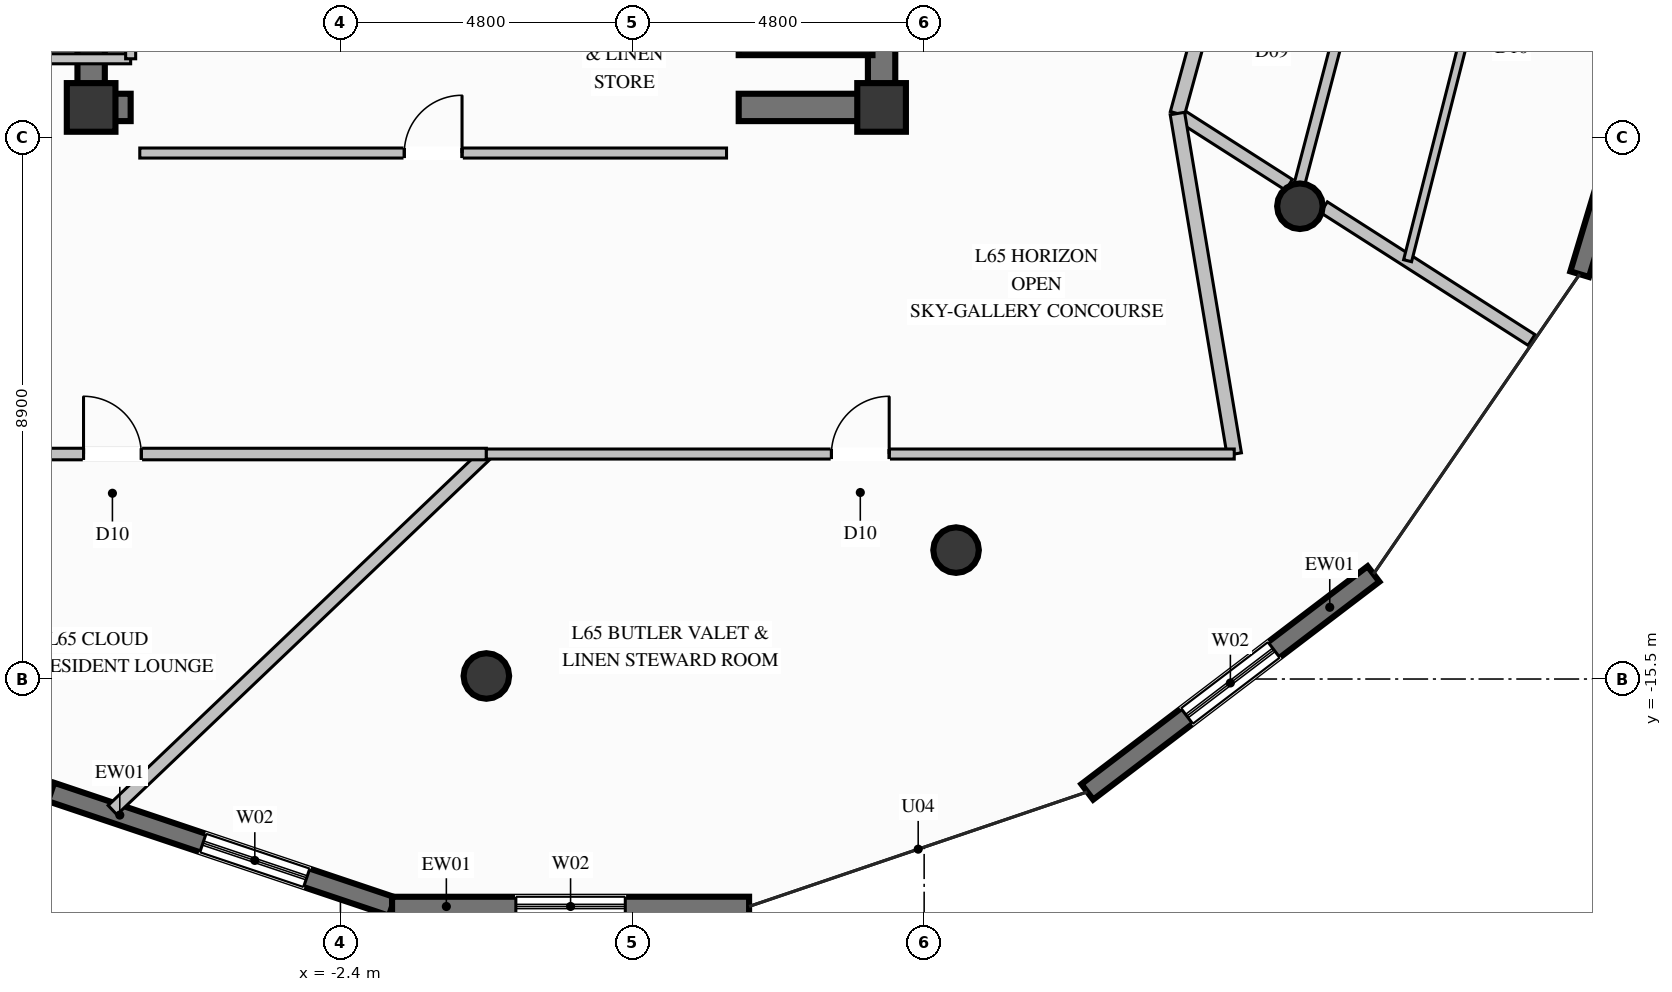
"""IFC4 building model, lengths in metres.
Left out: names, types, materials, properties, quantities, classifications, styles, units other than length and angle.
Written with IfcOpenShell. Run it as: python <this file> out.ifc"""

import sys

from ifc_helpers import new_model, si_unit, direction, frame, frame_2d, origin, origin_2d, place, context, subcontext, project, spatial, rectangle, circle, extrude, element, fill, save


model = new_model("IFC4")
c1 = context("Model", 3, precision=1e-05, world=origin(), true_north=direction((0.0, 1.0)))
c2 = subcontext(c1, "Body", "Model", "MODEL_VIEW")
j1 = project(units=[si_unit("LENGTHUNIT", "METRE"), si_unit("PLANEANGLEUNIT", "RADIAN")], contexts=[c1])
p1 = place(None, origin())
s1 = spatial("IfcSite", under=j1, at=p1, CompositionType="ELEMENT")
p2 = place(p1, origin())
s2 = spatial("IfcBuilding", under=s1, at=p2, CompositionType="ELEMENT")
p3 = place(p2, frame((0.0, 0.0, 250.6)))
s3 = spatial("IfcBuildingStorey", under=s2, at=p3, CompositionType="ELEMENT", Elevation=250.6)
for number, where, z_axis, x_axis in (
    (1, (-6.5, -6.1, 0.0), (0.0, 0.0, 1.0), (1.0, 0.0, 0.0)),
    (2, (6.5, -6.1, 0.0), (0.0, 0.0, 1.0), (1.0, 0.0, 0.0)),
):
    element("IfcColumn", number, at=place(p3, frame(where, z_axis=z_axis, x_axis=x_axis)), inside=s3, PredefinedType="COLUMN", context=c2, shape_type="SweptSolid", body=[
        extrude(rectangle(XDim=0.8, YDim=0.8, at=origin_2d()), origin(), (0.0, 0.0, 1.0), 3.8),
    ])
p4 = place(p3, frame((-6.275, -6.1, 0.0), z_axis=(0.0, 0.0, 1.0), x_axis=(1.0, 0.0, 0.0)))
e3 = element("IfcWall", 3, at=p4, inside=s3, PredefinedType="SHEAR", context=c2, shape_type="SweptSolid", body=[
    extrude(rectangle(XDim=0.425, YDim=0.45, at=frame_2d((0.212, 0.0))), origin(), (0.0, 0.0, 1.0), 3.8),
])
p5 = place(p3, frame((4.15, -6.1, 0.0), z_axis=(0.0, 0.0, 1.0), x_axis=(1.0, 0.0, 0.0)))
e4 = element("IfcWall", 4, at=p5, inside=s3, PredefinedType="SHEAR", context=c2, shape_type="SweptSolid", body=[
    extrude(rectangle(XDim=2.125, YDim=0.45, at=frame_2d((1.062, 0.0))), origin(), (0.0, 0.0, 1.0), 3.8),
])
p6 = place(p3, frame((-6.5, -6.325, 0.0), z_axis=(0.0, 0.0, 1.0), x_axis=(0.0, 1.0, 0.0)))
e5 = element("IfcWall", 5, at=p6, inside=s3, PredefinedType="SHEAR", context=c2, shape_type="SweptSolid", body=[
    extrude(rectangle(XDim=2.975, YDim=0.45, at=frame_2d((1.487, 0.0))), origin(), (0.0, 0.0, 1.0), 3.8),
])
p7 = place(p3, frame((6.5, -6.325, 0.0), z_axis=(0.0, 0.0, 1.0), x_axis=(0.0, 1.0, 0.0)))
e6 = element("IfcWall", 6, at=p7, inside=s3, PredefinedType="SHEAR", context=c2, shape_type="SweptSolid", body=[
    extrude(rectangle(XDim=3.975, YDim=0.45, at=frame_2d((1.987, 0.0))), origin(), (0.0, 0.0, 1.0), 3.8),
])
for number, where, z_axis, x_axis in (
    (7, (0.0, -15.45, 0.0), (0.0, 0.0, 1.0), (1.0, 0.0, 0.0)),
    (8, (7.725, -13.38, 0.0), (0.0, 0.0, 1.0), (1.0, 0.0, 0.0)),
    (9, (13.38, -7.725, 0.0), (0.0, 0.0, 1.0), (1.0, 0.0, 0.0)),
):
    element("IfcColumn", number, at=place(p3, frame(where, z_axis=z_axis, x_axis=x_axis)), inside=s3, PredefinedType="COLUMN", context=c2, shape_type="SweptSolid", body=[
        extrude(circle(Radius=0.375, at=origin_2d()), origin(), (0.0, 0.0, 1.0), 3.8),
    ])
p8 = place(p3, frame((14.59, -13.773, 0.0), z_axis=(0.0, 0.0, 1.0), x_axis=(-0.795700701096, -0.605690015004, 0.0)))
e10 = element("IfcWall", 10, at=p8, inside=s3, PredefinedType="SOLIDWALL", context=c2, shape_type="SweptSolid", body=[
    extrude(rectangle(XDim=5.916, YDim=0.32, at=frame_2d((2.958, 0.0))), origin(), (0.0, 0.0, 1.0), 3.57),
])
p9 = place(p8, frame((2.058, 0.0, 0.35)))
e11 = element("IfcOpeningElement", 11, at=p9, cuts=e10, PredefinedType="OPENING", context=c2, shape_type="SweptSolid", body=[
    extrude(rectangle(XDim=1.8, YDim=2.6, at=frame_2d((0.9, 1.3))), frame((0.0, 0.17, 0.0), z_axis=(0.0, -1.0, 0.0), x_axis=(1.0, 0.0, 0.0)), (0.0, 0.0, 1.0), 0.34),
])
p10 = place(p3, frame((19.725, -3.045, 0.0), z_axis=(0.0, 0.0, 1.0), x_axis=(-0.288106265848, -0.957598443806, 0.0)))
e12 = element("IfcWall", 12, at=p10, inside=s3, PredefinedType="SOLIDWALL", context=c2, shape_type="SweptSolid", body=[
    extrude(rectangle(XDim=6.054, YDim=0.32, at=frame_2d((3.027, 0.0))), origin(), (0.0, 0.0, 1.0), 3.57),
])
p11 = place(p10, frame((2.127, 0.0, 0.35)))
e13 = element("IfcOpeningElement", 13, at=p11, cuts=e12, PredefinedType="OPENING", context=c2, shape_type="SweptSolid", body=[
    extrude(rectangle(XDim=1.8, YDim=2.6, at=frame_2d((0.9, 1.3))), frame((0.0, 0.17, 0.0), z_axis=(0.0, -1.0, 0.0), x_axis=(1.0, 0.0, 0.0)), (0.0, 0.0, 1.0), 0.34),
])
p12 = place(p3, frame((-1.551, -19.241, 0.0), z_axis=(0.0, 0.0, 1.0), x_axis=(-0.947983518986, 0.31831941149, 0.0)))
e14 = element("IfcWall", 14, at=p12, inside=s3, PredefinedType="SOLIDWALL", context=c2, shape_type="SweptSolid", body=[
    extrude(rectangle(XDim=5.916, YDim=0.32, at=frame_2d((2.958, 0.0))), origin(), (0.0, 0.0, 1.0), 3.57),
])
p13 = place(p12, frame((1.481, 0.0, 0.35)))
e15 = element("IfcOpeningElement", 15, at=p13, cuts=e14, PredefinedType="OPENING", context=c2, shape_type="SweptSolid", body=[
    extrude(rectangle(XDim=1.8, YDim=2.6, at=frame_2d((0.9, 1.3))), frame((0.0, 0.17, 0.0), z_axis=(0.0, -1.0, 0.0), x_axis=(1.0, 0.0, 0.0)), (0.0, 0.0, 1.0), 0.34),
])
p14 = place(p3, frame((4.321, -19.24, 0.0), z_axis=(0.0, 0.0, 1.0), x_axis=(-0.999999986171, -0.000166306334, 0.0)))
e16 = element("IfcWall", 16, at=p14, inside=s3, PredefinedType="SOLIDWALL", context=c2, shape_type="SweptSolid", body=[
    extrude(rectangle(XDim=5.872, YDim=0.32, at=frame_2d((2.936, 0.0))), origin(), (0.0, 0.0, 1.0), 3.57),
])
p15 = place(p14, frame((2.036, 0.0, 0.35)))
e17 = element("IfcOpeningElement", 17, at=p15, cuts=e16, PredefinedType="OPENING", context=c2, shape_type="SweptSolid", body=[
    extrude(rectangle(XDim=1.8, YDim=2.6, at=frame_2d((0.9, 1.3))), frame((0.0, 0.17, 0.0), z_axis=(0.0, -1.0, 0.0), x_axis=(1.0, 0.0, 0.0)), (0.0, 0.0, 1.0), 0.34),
])
p16 = place(p3, frame((4.15, -5.1, 0.0), z_axis=(0.0, 0.0, 1.0), x_axis=(1.0, 0.0, 0.0)))
e18 = element("IfcWall", 18, at=p16, inside=s3, PredefinedType="SOLIDWALL", context=c2, shape_type="SweptSolid", body=[
    extrude(rectangle(XDim=2.2, YDim=0.28, at=frame_2d((1.1, 0.0))), origin(), (0.0, 0.0, 1.0), 3.57),
])
p17 = place(p3, frame((-7.35, -5.3, 0.0), z_axis=(0.0, 0.0, 1.0), x_axis=(1.0, 0.0, 0.0)))
e19 = element("IfcWall", 19, at=p17, inside=s3, PredefinedType="PARTITIONING", context=c2, shape_type="SweptSolid", body=[
    extrude(rectangle(XDim=1.5, YDim=0.165, at=frame_2d((0.75, 0.0))), origin(), (0.0, 0.0, 1.0), 2.655),
])
p18 = place(p3, frame((-5.85, -5.3, 0.0), z_axis=(0.0, 0.0, 1.0), x_axis=(0.0, 1.0, 0.0)))
e20 = element("IfcWall", 20, at=p18, inside=s3, PredefinedType="PARTITIONING", context=c2, shape_type="SweptSolid", body=[
    extrude(rectangle(XDim=2.5, YDim=0.165, at=frame_2d((1.25, 0.0))), origin(), (0.0, 0.0, 1.0), 2.655),
])
p19 = place(p3, frame((-5.7, -6.85, 0.0), z_axis=(0.0, 0.0, 1.0), x_axis=(1.0, 0.0, 0.0)))
e21 = element("IfcWall", 21, at=p19, inside=s3, PredefinedType="PARTITIONING", context=c2, shape_type="SweptSolid", body=[
    extrude(rectangle(XDim=9.65, YDim=0.165, at=frame_2d((4.825, 0.0))), origin(), (0.0, 0.0, 1.0), 2.655),
])
p20 = place(p19, frame((4.35, 0.0, 0.0)))
e22 = element("IfcOpeningElement", 22, at=p20, cuts=e21, PredefinedType="OPENING", context=c2, shape_type="SweptSolid", body=[
    extrude(rectangle(XDim=0.95, YDim=2.1, at=frame_2d((0.475, 1.05))), frame((0.0, 0.093, 0.0), z_axis=(0.0, -1.0, 0.0), x_axis=(1.0, 0.0, 0.0)), (0.0, 0.0, 1.0), 0.185),
])
p21 = place(p3, frame((11.365, -6.2, 0.0), z_axis=(0.0, 0.0, 1.0), x_axis=(0.842537994554, -0.538636916422, 0.0)))
e23 = element("IfcWall", 23, at=p21, inside=s3, PredefinedType="PARTITIONING", context=c2, shape_type="SweptSolid", body=[
    extrude(rectangle(XDim=2.178, YDim=0.21, at=frame_2d((1.089, 0.0))), origin(), (0.0, 0.0, 1.0), 3.086),
])
p22 = place(p3, frame((13.775, -7.741, 0.0), z_axis=(0.0, 0.0, 1.0), x_axis=(0.842483599118, -0.538721992514, 0.0)))
e24 = element("IfcWall", 24, at=p22, inside=s3, PredefinedType="PARTITIONING", context=c2, shape_type="SweptSolid", body=[
    extrude(rectangle(XDim=4.052, YDim=0.21, at=frame_2d((2.026, 0.0))), origin(), (0.0, 0.0, 1.0), 3.57),
])
p23 = place(p3, frame((11.365, -6.2, 0.0), z_axis=(0.0, 0.0, 1.0), x_axis=(0.263670269996, 0.964612869871, 0.0)))
e25 = element("IfcWall", 25, at=p23, inside=s3, PredefinedType="PARTITIONING", context=c2, shape_type="SweptSolid", body=[
    extrude(rectangle(XDim=2.765, YDim=0.24, at=frame_2d((1.382, 0.0))), origin(), (0.0, 0.0, 1.0), 3.57),
])
p24 = place(p3, frame((13.345, -7.466, 0.0), z_axis=(0.0, 0.0, 1.0), x_axis=(0.253626036533, 0.967302348593, 0.0)))
e26 = element("IfcWall", 26, at=p24, inside=s3, PredefinedType="PLUMBINGWALL", context=c2, shape_type="SweptSolid", body=[
    extrude(rectangle(XDim=3.284, YDim=0.175, at=frame_2d((1.642, 0.0))), origin(), (0.0, 0.0, 1.0), 3.139),
])
p25 = place(p3, frame((15.151, -8.621, 0.0), z_axis=(0.0, 0.0, 1.0), x_axis=(0.246404425265, 0.969167095608, 0.0)))
e27 = element("IfcWall", 27, at=p25, inside=s3, PredefinedType="PARTITIONING", context=c2, shape_type="SweptSolid", body=[
    extrude(rectangle(XDim=8.949, YDim=0.135, at=frame_2d((4.475, 0.0))), origin(), (0.0, 0.0, 1.0), 3.57),
])
p26 = place(p25, frame((3.999, 0.0, 0.0)))
e28 = element("IfcOpeningElement", 28, at=p26, cuts=e27, PredefinedType="OPENING", context=c2, shape_type="SweptSolid", body=[
    extrude(rectangle(XDim=0.95, YDim=2.1, at=frame_2d((0.475, 1.05))), frame((0.0, 0.078, 0.0), z_axis=(0.0, -1.0, 0.0), x_axis=(1.0, 0.0, 0.0)), (0.0, 0.0, 1.0), 0.155),
])
p27 = place(p3, frame((0.0, -11.8, 0.0), z_axis=(0.0, 0.0, 1.0), x_axis=(-0.724150240548, -0.689642247193, 0.0)))
e29 = element("IfcWall", 29, at=p27, inside=s3, PredefinedType="PARTITIONING", context=c2, shape_type="SweptSolid", body=[
    extrude(rectangle(XDim=8.49, YDim=0.21, at=frame_2d((4.245, 0.0))), origin(), (0.0, 0.0, 1.0), 3.57),
])
p28 = place(p3, frame((-12.3, -11.8, 0.0), z_axis=(0.0, 0.0, 1.0), x_axis=(1.0, 0.0, 0.0)))
e30 = element("IfcWall", 30, at=p28, inside=s3, PredefinedType="PARTITIONING", context=c2, shape_type="SweptSolid", body=[
    extrude(rectangle(XDim=12.3, YDim=0.19, at=frame_2d((6.15, 0.0))), origin(), (0.0, 0.0, 1.0), 3.57),
])
p29 = place(p28, frame((5.675, 0.0, 0.0)))
e31 = element("IfcOpeningElement", 31, at=p29, cuts=e30, PredefinedType="OPENING", context=c2, shape_type="SweptSolid", body=[
    extrude(rectangle(XDim=0.95, YDim=2.1, at=frame_2d((0.475, 1.05))), frame((0.0, 0.105, 0.0), z_axis=(0.0, -1.0, 0.0), x_axis=(1.0, 0.0, 0.0)), (0.0, 0.0, 1.0), 0.21),
])
p30 = place(p3, frame((12.3, -11.8, 0.0), z_axis=(0.0, 0.0, 1.0), x_axis=(-0.164691848211, 0.986345068996, 0.0)))
e32 = element("IfcWall", 32, at=p30, inside=s3, PredefinedType="PARTITIONING", context=c2, shape_type="SweptSolid", body=[
    extrude(rectangle(XDim=5.678, YDim=0.24, at=frame_2d((2.839, 0.0))), origin(), (0.0, 0.0, 1.0), 3.57),
])
p31 = place(p3, frame((0.0, -11.8, 0.0), z_axis=(0.0, 0.0, 1.0), x_axis=(1.0, 0.0, 0.0)))
e33 = element("IfcWall", 33, at=p31, inside=s3, PredefinedType="PARTITIONING", context=c2, shape_type="SweptSolid", body=[
    extrude(rectangle(XDim=12.3, YDim=0.165, at=frame_2d((6.15, 0.0))), origin(), (0.0, 0.0, 1.0), 3.57),
])
p32 = place(p31, frame((5.675, 0.0, 0.0)))
e34 = element("IfcOpeningElement", 34, at=p32, cuts=e33, PredefinedType="OPENING", context=c2, shape_type="SweptSolid", body=[
    extrude(rectangle(XDim=0.95, YDim=2.1, at=frame_2d((0.475, 1.05))), frame((0.0, 0.093, 0.0), z_axis=(0.0, -1.0, 0.0), x_axis=(1.0, 0.0, 0.0)), (0.0, 0.0, 1.0), 0.185),
])
p33 = place(p9, origin())
e35 = element("IfcWindow", 35, at=p33, inside=s3, PartitioningType="SINGLE_PANEL", PredefinedType="WINDOW", context=c2, shape_type="SweptSolid", body=[
    extrude(rectangle(XDim=1.8, YDim=2.6, at=frame_2d((0.9, 1.3))), frame((0.0, 0.03, 0.0), z_axis=(0.0, -1.0, 0.0), x_axis=(1.0, 0.0, 0.0)), (0.0, 0.0, 1.0), 0.06),
])
fill(e11, e35)
p34 = place(p13, origin())
e36 = element("IfcWindow", 36, at=p34, inside=s3, PartitioningType="SINGLE_PANEL", PredefinedType="WINDOW", context=c2, shape_type="SweptSolid", body=[
    extrude(rectangle(XDim=1.8, YDim=2.6, at=frame_2d((0.9, 1.3))), frame((0.0, 0.03, 0.0), z_axis=(0.0, -1.0, 0.0), x_axis=(1.0, 0.0, 0.0)), (0.0, 0.0, 1.0), 0.06),
])
fill(e15, e36)
p35 = place(p15, origin())
e37 = element("IfcWindow", 37, at=p35, inside=s3, PartitioningType="SINGLE_PANEL", PredefinedType="WINDOW", context=c2, shape_type="SweptSolid", body=[
    extrude(rectangle(XDim=1.8, YDim=2.6, at=frame_2d((0.9, 1.3))), frame((0.0, 0.03, 0.0), z_axis=(0.0, -1.0, 0.0), x_axis=(1.0, 0.0, 0.0)), (0.0, 0.0, 1.0), 0.06),
])
fill(e17, e37)
p36 = place(p20, origin())
e38 = element("IfcDoor", 38, at=p36, inside=s3, OperationType="SINGLE_SWING_RIGHT", PredefinedType="DOOR", context=c2, shape_type="SweptSolid", body=[
    extrude(rectangle(XDim=0.95, YDim=2.1, at=frame_2d((0.475, 1.05))), frame((0.0, 0.025, 0.0), z_axis=(0.0, -1.0, 0.0), x_axis=(1.0, 0.0, 0.0)), (0.0, 0.0, 1.0), 0.05),
])
fill(e22, e38)
p37 = place(p29, origin())
e39 = element("IfcDoor", 39, at=p37, inside=s3, OperationType="SINGLE_SWING_LEFT", PredefinedType="DOOR", context=c2, shape_type="SweptSolid", body=[
    extrude(rectangle(XDim=0.95, YDim=2.1, at=frame_2d((0.475, 1.05))), frame((0.0, 0.025, 0.0), z_axis=(0.0, -1.0, 0.0), x_axis=(1.0, 0.0, 0.0)), (0.0, 0.0, 1.0), 0.05),
])
fill(e31, e39)
p38 = place(p32, origin())
e40 = element("IfcDoor", 40, at=p38, inside=s3, OperationType="SINGLE_SWING_RIGHT", PredefinedType="DOOR", context=c2, shape_type="SweptSolid", body=[
    extrude(rectangle(XDim=0.95, YDim=2.1, at=frame_2d((0.475, 1.05))), frame((0.0, 0.025, 0.0), z_axis=(0.0, -1.0, 0.0), x_axis=(1.0, 0.0, 0.0)), (0.0, 0.0, 1.0), 0.05),
])
fill(e34, e40)
save(model, sys.argv[1])
